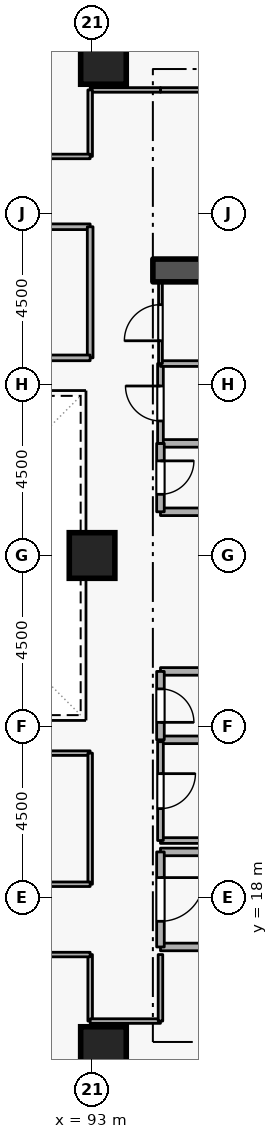
"""IFC4 building model, lengths in metres.
Left out: names, types, materials, properties, quantities, classifications, styles, units other than length and angle.
Written with IfcOpenShell. Run it as: python <this file> out.ifc"""

import sys

from ifc_helpers import new_model, si_unit, direction, frame, frame_2d, origin, origin_2d, place, context, subcontext, project, spatial, rectangle, extrude, element, fill, save


model = new_model("IFC4")
c1 = context("Model", 3, precision=1e-05, world=origin(), true_north=direction((0.0, 1.0)))
c2 = subcontext(c1, "Body", "Model", "MODEL_VIEW")
j1 = project(units=[si_unit("LENGTHUNIT", "METRE"), si_unit("PLANEANGLEUNIT", "RADIAN")], contexts=[c1])
p1 = place(None, origin())
s1 = spatial("IfcSite", under=j1, at=p1, CompositionType="ELEMENT")
p2 = place(p1, origin())
s2 = spatial("IfcBuilding", under=s1, at=p2, CompositionType="ELEMENT")
p3 = place(p2, frame((0.0, 0.0, 108.9)))
s3 = spatial("IfcBuildingStorey", under=s2, at=p3, CompositionType="ELEMENT", Elevation=108.9)
p4 = place(p3, frame((94.6, 34.5, 0.0), z_axis=(0.0, 0.0, 1.0), x_axis=(1.0, 0.0, 0.0)))
e1 = element("IfcWall", 1, at=p4, inside=s3, PredefinedType="SHEAR", context=c2, shape_type="SweptSolid", body=[
    extrude(rectangle(XDim=5.7, YDim=0.6, at=frame_2d((2.85, 0.0))), origin(), (0.0, 0.0, 1.0), 3.6),
])
for number, where, z_axis, x_axis in (
    (2, (93.3, 14.0, 0.0), (0.0, 0.0, 1.0), (1.0, 0.0, 0.0)),
    (3, (93.3, 40.0, 0.0), (0.0, 0.0, 1.0), (1.0, 0.0, 0.0)),
    (4, (93.0, 27.0, 0.0), (0.0, 0.0, 1.0), (1.0, 0.0, 0.0)),
):
    element("IfcColumn", number, at=place(p3, frame(where, z_axis=z_axis, x_axis=x_axis)), inside=s3, PredefinedType="COLUMN", context=c2, shape_type="SweptSolid", body=[
        extrude(rectangle(XDim=1.2, YDim=1.2, at=origin_2d()), origin(), (0.0, 0.0, 1.0), 3.6),
    ])
p5 = place(p3, frame((94.8, 16.7, 0.0), z_axis=(0.0, 0.0, 1.0), x_axis=(1.0, 0.0, 0.0)))
e5 = element("IfcWall", 5, at=p5, inside=s3, PredefinedType="STANDARD", context=c2, shape_type="SweptSolid", body=[
    extrude(rectangle(XDim=5.7, YDim=0.2, at=frame_2d((2.85, 0.0))), origin(), (0.0, 0.0, 1.0), 3.34),
])
p6 = place(p3, frame((97.1, 19.2, 0.0), z_axis=(0.0, 0.0, 1.0), x_axis=(-1.0, 0.0, 0.0)))
e6 = element("IfcWall", 6, at=p6, inside=s3, PredefinedType="STANDARD", context=c2, shape_type="SweptSolid", body=[
    extrude(rectangle(XDim=2.3, YDim=0.2, at=frame_2d((1.15, 0.0))), origin(), (0.0, 0.0, 1.0), 2.545),
])
p7 = place(p3, frame((94.8, 19.2, 0.0), z_axis=(0.0, 0.0, 1.0), x_axis=(0.0, -1.0, 0.0)))
e7 = element("IfcWall", 7, at=p7, inside=s3, PredefinedType="STANDARD", context=c2, shape_type="SweptSolid", body=[
    extrude(rectangle(XDim=2.5, YDim=0.2, at=frame_2d((1.25, 0.0))), origin(), (0.0, 0.0, 1.0), 3.34),
])
p8 = place(p7, frame((0.675, 0.0, 0.0)))
e8 = element("IfcOpeningElement", 8, at=p8, cuts=e7, PredefinedType="OPENING", context=c2, shape_type="SweptSolid", body=[
    extrude(rectangle(XDim=1.15, YDim=2.1, at=frame_2d((0.575, 1.05))), frame((0.0, 0.11, 0.0), z_axis=(0.0, -1.0, 0.0), x_axis=(1.0, 0.0, 0.0)), (0.0, 0.0, 1.0), 0.22),
])
for number, where, z_axis, x_axis in (
    (9, (94.8, 28.15, 0.0), (0.0, 0.0, 1.0), (1.0, 0.0, 0.0)),
    (10, (96.85, 29.95, 0.0), (0.0, 0.0, 1.0), (-1.0, 0.0, 0.0)),
):
    element("IfcWall", number, at=place(p3, frame(where, z_axis=z_axis, x_axis=x_axis)), inside=s3, PredefinedType="STANDARD", context=c2, shape_type="SweptSolid", body=[
        extrude(rectangle(XDim=2.05, YDim=0.2, at=frame_2d((1.025, 0.0))), origin(), (0.0, 0.0, 1.0), 3.34),
    ])
p9 = place(p3, frame((94.8, 29.95, 0.0), z_axis=(0.0, 0.0, 1.0), x_axis=(0.0, -1.0, 0.0)))
e11 = element("IfcWall", 11, at=p9, inside=s3, PredefinedType="STANDARD", context=c2, shape_type="SweptSolid", body=[
    extrude(rectangle(XDim=1.8, YDim=0.2, at=frame_2d((0.9, 0.0))), origin(), (0.0, 0.0, 1.0), 3.34),
])
p10 = place(p9, frame((0.46, 0.0, 0.0)))
e12 = element("IfcOpeningElement", 12, at=p10, cuts=e11, PredefinedType="OPENING", context=c2, shape_type="SweptSolid", body=[
    extrude(rectangle(XDim=0.88, YDim=2.04, at=frame_2d((0.44, 1.02))), frame((0.0, 0.11, 0.0), z_axis=(0.0, -1.0, 0.0), x_axis=(1.0, 0.0, 0.0)), (0.0, 0.0, 1.0), 0.22),
])
for number, where, z_axis, x_axis in (
    (13, (94.8, 22.15, 0.0), (0.0, 0.0, 1.0), (1.0, 0.0, 0.0)),
    (14, (96.85, 23.95, 0.0), (0.0, 0.0, 1.0), (-1.0, 0.0, 0.0)),
):
    element("IfcWall", number, at=place(p3, frame(where, z_axis=z_axis, x_axis=x_axis)), inside=s3, PredefinedType="STANDARD", context=c2, shape_type="SweptSolid", body=[
        extrude(rectangle(XDim=2.05, YDim=0.2, at=frame_2d((1.025, 0.0))), origin(), (0.0, 0.0, 1.0), 3.34),
    ])
p11 = place(p3, frame((94.8, 23.95, 0.0), z_axis=(0.0, 0.0, 1.0), x_axis=(0.0, -1.0, 0.0)))
e15 = element("IfcWall", 15, at=p11, inside=s3, PredefinedType="STANDARD", context=c2, shape_type="SweptSolid", body=[
    extrude(rectangle(XDim=1.8, YDim=0.2, at=frame_2d((0.9, 0.0))), origin(), (0.0, 0.0, 1.0), 3.34),
])
p12 = place(p11, frame((0.46, 0.0, 0.0)))
e16 = element("IfcOpeningElement", 16, at=p12, cuts=e15, PredefinedType="OPENING", context=c2, shape_type="SweptSolid", body=[
    extrude(rectangle(XDim=0.88, YDim=2.04, at=frame_2d((0.44, 1.02))), frame((0.0, 0.11, 0.0), z_axis=(0.0, -1.0, 0.0), x_axis=(1.0, 0.0, 0.0)), (0.0, 0.0, 1.0), 0.22),
])
p13 = place(p3, frame((94.8, 19.5, 0.0), z_axis=(0.0, 0.0, 1.0), x_axis=(1.0, 0.0, 0.0)))
e17 = element("IfcWall", 17, at=p13, inside=s3, PredefinedType="PARTITIONING", context=c2, shape_type="SweptSolid", body=[
    extrude(rectangle(XDim=2.05, YDim=0.15, at=frame_2d((1.025, 0.0))), origin(), (0.0, 0.0, 1.0), 2.545),
])
p14 = place(p3, frame((94.8, 22.1, 0.0), z_axis=(0.0, 0.0, 1.0), x_axis=(0.0, -1.0, 0.0)))
e18 = element("IfcWall", 18, at=p14, inside=s3, PredefinedType="PARTITIONING", context=c2, shape_type="SweptSolid", body=[
    extrude(rectangle(XDim=2.6, YDim=0.15, at=frame_2d((1.3, 0.0))), origin(), (0.0, 0.0, 1.0), 3.34),
])
p15 = place(p14, frame((0.84, 0.0, 0.0)))
e19 = element("IfcOpeningElement", 19, at=p15, cuts=e18, PredefinedType="OPENING", context=c2, shape_type="SweptSolid", body=[
    extrude(rectangle(XDim=0.92, YDim=2.08, at=frame_2d((0.46, 1.04))), frame((0.0, 0.085, 0.0), z_axis=(0.0, -1.0, 0.0), x_axis=(1.0, 0.0, 0.0)), (0.0, 0.0, 1.0), 0.17),
])
p16 = place(p3, frame((94.8, 29.95, 0.0), z_axis=(0.0, 0.0, 1.0), x_axis=(0.0, 1.0, 0.0)))
e20 = element("IfcWall", 20, at=p16, inside=s3, PredefinedType="PARTITIONING", context=c2, shape_type="SweptSolid", body=[
    extrude(rectangle(XDim=2.1, YDim=0.15, at=frame_2d((1.05, 0.0))), origin(), (0.0, 0.0, 1.0), 3.34),
])
p17 = place(p16, frame((0.59, 0.0, 0.0)))
e21 = element("IfcOpeningElement", 21, at=p17, cuts=e20, PredefinedType="OPENING", context=c2, shape_type="SweptSolid", body=[
    extrude(rectangle(XDim=0.92, YDim=2.08, at=frame_2d((0.46, 1.04))), frame((0.0, 0.085, 0.0), z_axis=(0.0, -1.0, 0.0), x_axis=(1.0, 0.0, 0.0)), (0.0, 0.0, 1.0), 0.17),
])
p18 = place(p3, frame((94.8, 32.05, 0.0), z_axis=(0.0, 0.0, 1.0), x_axis=(1.0, 0.0, 0.0)))
e22 = element("IfcWall", 22, at=p18, inside=s3, PredefinedType="PARTITIONING", context=c2, shape_type="SweptSolid", body=[
    extrude(rectangle(XDim=2.05, YDim=0.15, at=frame_2d((1.025, 0.0))), origin(), (0.0, 0.0, 1.0), 3.34),
])
p19 = place(p3, frame((94.8, 32.05, 0.0), z_axis=(0.0, 0.0, 1.0), x_axis=(0.0, 1.0, 0.0)))
e23 = element("IfcWall", 23, at=p19, inside=s3, PredefinedType="PARTITIONING", context=c2, shape_type="SweptSolid", body=[
    extrude(rectangle(XDim=2.15, YDim=0.1, at=frame_2d((1.075, 0.0))), origin(), (0.0, 0.0, 1.0), 3.34),
])
p20 = place(p19, frame((0.6, 0.0, 0.0)))
e24 = element("IfcOpeningElement", 24, at=p20, cuts=e23, PredefinedType="OPENING", context=c2, shape_type="SweptSolid", body=[
    extrude(rectangle(XDim=0.95, YDim=2.1, at=frame_2d((0.475, 1.05))), frame((0.0, 0.06, 0.0), z_axis=(0.0, -1.0, 0.0), x_axis=(1.0, 0.0, 0.0)), (0.0, 0.0, 1.0), 0.12),
])
p21 = place(p3, frame((92.95, 16.5, 0.0), z_axis=(0.0, 0.0, 1.0), x_axis=(0.0, -1.0, 0.0)))
e25 = element("IfcWall", 25, at=p21, inside=s3, PredefinedType="PARTITIONING", context=c2, shape_type="SweptSolid", body=[
    extrude(rectangle(XDim=1.75, YDim=0.12, at=frame_2d((0.875, 0.0))), origin(), (0.0, 0.0, 1.0), 3.34),
])
p22 = place(p3, frame((92.95, 14.75, 0.0), z_axis=(0.0, 0.0, 1.0), x_axis=(1.0, 0.0, 0.0)))
e26 = element("IfcWall", 26, at=p22, inside=s3, PredefinedType="PARTITIONING", context=c2, shape_type="SweptSolid", body=[
    extrude(rectangle(XDim=1.85, YDim=0.12, at=frame_2d((0.925, 0.0))), origin(), (0.0, 0.0, 1.0), 3.34),
])
p23 = place(p3, frame((94.8, 14.75, 0.0), z_axis=(0.0, 0.0, 1.0), x_axis=(0.0, 1.0, 0.0)))
e27 = element("IfcWall", 27, at=p23, inside=s3, PredefinedType="PARTITIONING", context=c2, shape_type="SweptSolid", body=[
    extrude(rectangle(XDim=1.75, YDim=0.12, at=frame_2d((0.875, 0.0))), origin(), (0.0, 0.0, 1.0), 3.34),
])
p24 = place(p3, frame((88.5, 16.5, 0.0), z_axis=(0.0, 0.0, 1.0), x_axis=(1.0, 0.0, 0.0)))
e28 = element("IfcWall", 28, at=p24, inside=s3, PredefinedType="PARTITIONING", context=c2, shape_type="SweptSolid", body=[
    extrude(rectangle(XDim=4.45, YDim=0.12, at=frame_2d((2.225, 0.0))), origin(), (0.0, 0.0, 1.0), 3.34),
])
p25 = place(p24, frame((1.7, 0.0, 0.0)))
e29 = element("IfcOpeningElement", 29, at=p25, cuts=e28, PredefinedType="OPENING", context=c2, shape_type="SweptSolid", body=[
    extrude(rectangle(XDim=1.05, YDim=2.1, at=frame_2d((0.525, 1.05))), frame((0.0, 0.07, 0.0), z_axis=(0.0, -1.0, 0.0), x_axis=(1.0, 0.0, 0.0)), (0.0, 0.0, 1.0), 0.14),
])
p26 = place(p3, frame((97.95, 39.25, 0.0), z_axis=(0.0, 0.0, 1.0), x_axis=(-1.0, 0.0, 0.0)))
e30 = element("IfcWall", 30, at=p26, inside=s3, PredefinedType="PARTITIONING", context=c2, shape_type="SweptSolid", body=[
    extrude(rectangle(XDim=3.15, YDim=0.12, at=frame_2d((1.575, 0.0))), origin(), (0.0, 0.0, 1.0), 3.34),
])
p27 = place(p3, frame((94.8, 39.25, 0.0), z_axis=(0.0, 0.0, 1.0), x_axis=(-1.0, 0.0, 0.0)))
e31 = element("IfcWall", 31, at=p27, inside=s3, PredefinedType="PARTITIONING", context=c2, shape_type="SweptSolid", body=[
    extrude(rectangle(XDim=1.85, YDim=0.12, at=frame_2d((0.925, 0.0))), origin(), (0.0, 0.0, 1.0), 3.34),
])
p28 = place(p3, frame((92.95, 39.25, 0.0), z_axis=(0.0, 0.0, 1.0), x_axis=(0.0, -1.0, 0.0)))
e32 = element("IfcWall", 32, at=p28, inside=s3, PredefinedType="PARTITIONING", context=c2, shape_type="SweptSolid", body=[
    extrude(rectangle(XDim=1.75, YDim=0.12, at=frame_2d((0.875, 0.0))), origin(), (0.0, 0.0, 1.0), 3.34),
])
p29 = place(p3, frame((92.95, 37.5, 0.0), z_axis=(0.0, 0.0, 1.0), x_axis=(-1.0, 0.0, 0.0)))
e33 = element("IfcWall", 33, at=p29, inside=s3, PredefinedType="PARTITIONING", context=c2, shape_type="SweptSolid", body=[
    extrude(rectangle(XDim=4.45, YDim=0.12, at=frame_2d((2.225, 0.0))), origin(), (0.0, 0.0, 1.0), 3.34),
])
p30 = place(p29, frame((1.7, 0.0, 0.0)))
e34 = element("IfcOpeningElement", 34, at=p30, cuts=e33, PredefinedType="OPENING", context=c2, shape_type="SweptSolid", body=[
    extrude(rectangle(XDim=1.05, YDim=2.1, at=frame_2d((0.525, 1.05))), frame((0.0, 0.07, 0.0), z_axis=(0.0, -1.0, 0.0), x_axis=(1.0, 0.0, 0.0)), (0.0, 0.0, 1.0), 0.14),
])
p31 = place(p3, frame((84.05, 35.65, 0.0), z_axis=(0.0, 0.0, 1.0), x_axis=(1.0, 0.0, 0.0)))
e35 = element("IfcWall", 35, at=p31, inside=s3, PredefinedType="PARTITIONING", context=c2, shape_type="SweptSolid", body=[
    extrude(rectangle(XDim=8.9, YDim=0.15, at=frame_2d((4.45, 0.0))), origin(), (0.0, 0.0, 1.0), 3.34),
])
p32 = place(p31, frame((3.8, 0.0, 0.0)))
e36 = element("IfcOpeningElement", 36, at=p32, cuts=e35, PredefinedType="OPENING", context=c2, shape_type="SweptSolid", body=[
    extrude(rectangle(XDim=1.3, YDim=2.12, at=frame_2d((0.65, 1.06))), frame((0.0, 0.085, 0.0), z_axis=(0.0, -1.0, 0.0), x_axis=(1.0, 0.0, 0.0)), (0.0, 0.0, 1.0), 0.17),
])
p33 = place(p3, frame((92.95, 35.65, 0.0), z_axis=(0.0, 0.0, 1.0), x_axis=(0.0, -1.0, 0.0)))
e37 = element("IfcWall", 37, at=p33, inside=s3, PredefinedType="PARTITIONING", context=c2, shape_type="SweptSolid", body=[
    extrude(rectangle(XDim=3.45, YDim=0.15, at=frame_2d((1.725, 0.0))), origin(), (0.0, 0.0, 1.0), 3.34),
])
p34 = place(p3, frame((92.95, 32.2, 0.0), z_axis=(0.0, 0.0, 1.0), x_axis=(-1.0, 0.0, 0.0)))
e38 = element("IfcWall", 38, at=p34, inside=s3, PredefinedType="PARTITIONING", context=c2, shape_type="SweptSolid", body=[
    extrude(rectangle(XDim=8.9, YDim=0.15, at=frame_2d((4.45, 0.0))), origin(), (0.0, 0.0, 1.0), 3.34),
])
p35 = place(p3, frame((84.05, 21.8, 0.0), z_axis=(0.0, 0.0, 1.0), x_axis=(1.0, 0.0, 0.0)))
e39 = element("IfcWall", 39, at=p35, inside=s3, PredefinedType="PARTITIONING", context=c2, shape_type="SweptSolid", body=[
    extrude(rectangle(XDim=8.9, YDim=0.12, at=frame_2d((4.45, 0.0))), origin(), (0.0, 0.0, 1.0), 3.34),
])
p36 = place(p3, frame((92.95, 21.8, 0.0), z_axis=(0.0, 0.0, 1.0), x_axis=(0.0, -1.0, 0.0)))
e40 = element("IfcWall", 40, at=p36, inside=s3, PredefinedType="PARTITIONING", context=c2, shape_type="SweptSolid", body=[
    extrude(rectangle(XDim=3.45, YDim=0.12, at=frame_2d((1.725, 0.0))), origin(), (0.0, 0.0, 1.0), 3.34),
])
p37 = place(p3, frame((92.95, 18.35, 0.0), z_axis=(0.0, 0.0, 1.0), x_axis=(-1.0, 0.0, 0.0)))
e41 = element("IfcWall", 41, at=p37, inside=s3, PredefinedType="PARTITIONING", context=c2, shape_type="SweptSolid", body=[
    extrude(rectangle(XDim=8.9, YDim=0.12, at=frame_2d((4.45, 0.0))), origin(), (0.0, 0.0, 1.0), 3.34),
])
p38 = place(p37, frame((3.975, 0.0, 0.0)))
e42 = element("IfcOpeningElement", 42, at=p38, cuts=e41, PredefinedType="OPENING", context=c2, shape_type="SweptSolid", body=[
    extrude(rectangle(XDim=0.95, YDim=2.1, at=frame_2d((0.475, 1.05))), frame((0.0, 0.07, 0.0), z_axis=(0.0, -1.0, 0.0), x_axis=(1.0, 0.0, 0.0)), (0.0, 0.0, 1.0), 0.14),
])
p39 = place(p8, origin())
e43 = element("IfcDoor", 43, at=p39, inside=s3, OperationType="SINGLE_SWING_LEFT", PredefinedType="DOOR", context=c2, shape_type="SweptSolid", body=[
    extrude(rectangle(XDim=1.15, YDim=2.1, at=frame_2d((0.575, 1.05))), frame((0.0, 0.025, 0.0), z_axis=(0.0, -1.0, 0.0), x_axis=(1.0, 0.0, 0.0)), (0.0, 0.0, 1.0), 0.05),
])
fill(e8, e43)
p40 = place(p10, origin())
e44 = element("IfcDoor", 44, at=p40, inside=s3, OperationType="SINGLE_SWING_LEFT", PredefinedType="DOOR", context=c2, shape_type="SweptSolid", body=[
    extrude(rectangle(XDim=0.88, YDim=2.04, at=frame_2d((0.44, 1.02))), frame((0.0, 0.025, 0.0), z_axis=(0.0, -1.0, 0.0), x_axis=(1.0, 0.0, 0.0)), (0.0, 0.0, 1.0), 0.05),
])
fill(e12, e44)
p41 = place(p12, origin())
e45 = element("IfcDoor", 45, at=p41, inside=s3, OperationType="SINGLE_SWING_RIGHT", PredefinedType="DOOR", context=c2, shape_type="SweptSolid", body=[
    extrude(rectangle(XDim=0.88, YDim=2.04, at=frame_2d((0.44, 1.02))), frame((0.0, 0.025, 0.0), z_axis=(0.0, -1.0, 0.0), x_axis=(1.0, 0.0, 0.0)), (0.0, 0.0, 1.0), 0.05),
])
fill(e16, e45)
p42 = place(p15, origin())
e46 = element("IfcDoor", 46, at=p42, inside=s3, OperationType="SINGLE_SWING_LEFT", PredefinedType="DOOR", context=c2, shape_type="SweptSolid", body=[
    extrude(rectangle(XDim=0.92, YDim=2.08, at=frame_2d((0.46, 1.04))), frame((0.0, 0.025, 0.0), z_axis=(0.0, -1.0, 0.0), x_axis=(1.0, 0.0, 0.0)), (0.0, 0.0, 1.0), 0.05),
])
fill(e19, e46)
p43 = place(p17, origin())
e47 = element("IfcDoor", 47, at=p43, inside=s3, OperationType="SINGLE_SWING_RIGHT", PredefinedType="DOOR", context=c2, shape_type="SweptSolid", body=[
    extrude(rectangle(XDim=0.92, YDim=2.08, at=frame_2d((0.46, 1.04))), frame((0.0, 0.025, 0.0), z_axis=(0.0, -1.0, 0.0), x_axis=(1.0, 0.0, 0.0)), (0.0, 0.0, 1.0), 0.05),
])
fill(e21, e47)
p44 = place(p20, origin())
e48 = element("IfcDoor", 48, at=p44, inside=s3, OperationType="SINGLE_SWING_LEFT", PredefinedType="DOOR", context=c2, shape_type="SweptSolid", body=[
    extrude(rectangle(XDim=0.95, YDim=2.1, at=frame_2d((0.475, 1.05))), frame((0.0, 0.025, 0.0), z_axis=(0.0, -1.0, 0.0), x_axis=(1.0, 0.0, 0.0)), (0.0, 0.0, 1.0), 0.05),
])
fill(e24, e48)
save(model, sys.argv[1])
